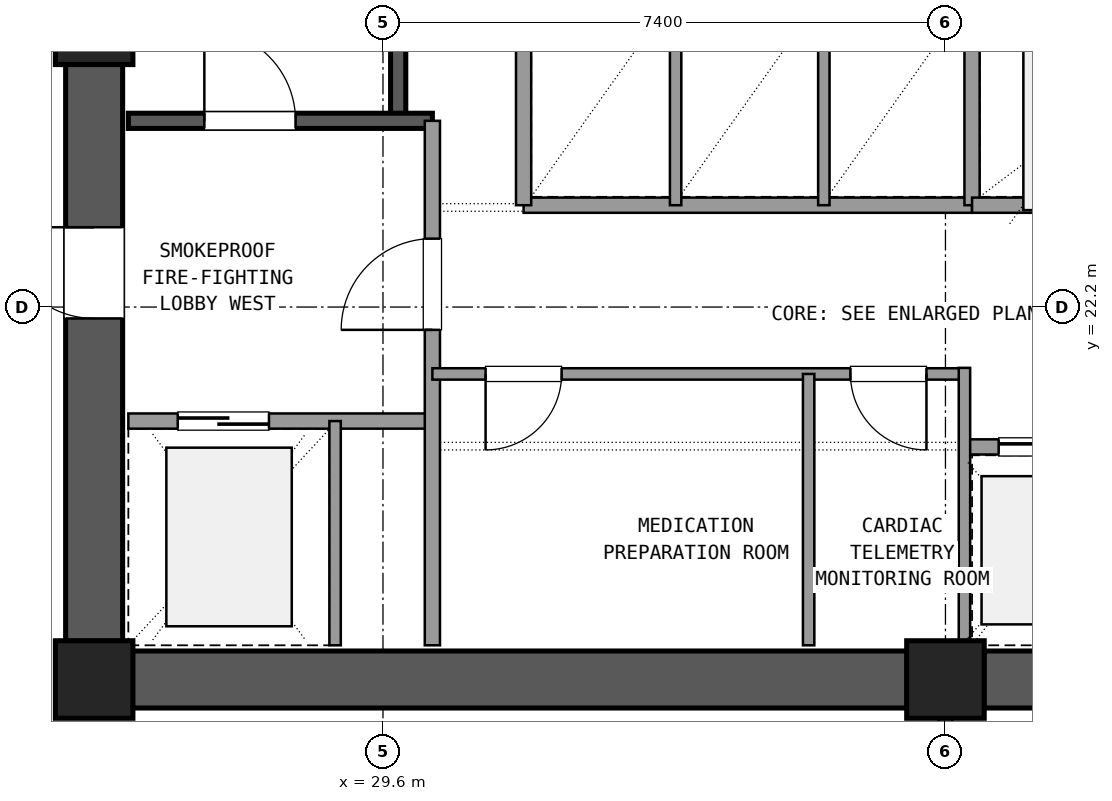
"""IFC4 building model, lengths in metres.
Left out: names, types, materials, properties, quantities, classifications, styles, units other than length and angle.
Written with IfcOpenShell. Run it as: python <this file> out.ifc"""

import sys

from ifc_helpers import new_model, si_unit, direction, frame, frame_2d, origin, origin_2d, place, context, subcontext, project, spatial, rectangle, extrude, element, fill, save


model = new_model("IFC4")
c1 = context("Model", 3, precision=1e-05, world=origin(), true_north=direction((0.0, 1.0)))
c2 = subcontext(c1, "Body", "Model", "MODEL_VIEW")
j1 = project(units=[si_unit("LENGTHUNIT", "METRE"), si_unit("PLANEANGLEUNIT", "RADIAN")], contexts=[c1])
p1 = place(None, origin())
s1 = spatial("IfcSite", under=j1, at=p1, CompositionType="ELEMENT")
p2 = place(p1, origin())
s2 = spatial("IfcBuilding", under=s1, at=p2, CompositionType="ELEMENT")
p3 = place(p2, frame((0.0, 0.0, 95.58)))
s3 = spatial("IfcBuildingStorey", under=s2, at=p3, CompositionType="ELEMENT", Elevation=95.58)
for number, where, z_axis, x_axis in (
    (1, (25.8, 17.3, 0.0), (0.0, 0.0, 1.0), (1.0, 0.0, 0.0)),
    (2, (37.0, 17.3, 0.0), (0.0, 0.0, 1.0), (1.0, 0.0, 0.0)),
    (3, (25.8, 25.9, 0.0), (0.0, 0.0, 1.0), (1.0, 0.0, 0.0)),
):
    element("IfcColumn", number, at=place(p3, frame(where, z_axis=z_axis, x_axis=x_axis)), inside=s3, PredefinedType="COLUMN", context=c2, shape_type="SweptSolid", body=[
        extrude(rectangle(XDim=1.02, YDim=1.02, at=origin_2d()), origin(), (0.0, 0.0, 1.0), 3.6),
    ])
for number, where, z_axis, x_axis in (
    (4, (26.305, 17.3, 0.0), (0.0, 0.0, 1.0), (1.0, 0.0, 0.0)),
    (5, (37.505, 17.3, 0.0), (0.0, 0.0, 1.0), (1.0, 0.0, 0.0)),
):
    element("IfcWall", number, at=place(p3, frame(where, z_axis=z_axis, x_axis=x_axis)), inside=s3, PredefinedType="SHEAR", context=c2, shape_type="SweptSolid", body=[
        extrude(rectangle(XDim=10.19, YDim=0.75, at=frame_2d((5.095, 0.0))), origin(), (0.0, 0.0, 1.0), 3.32),
    ])
p4 = place(p3, frame((25.8, 25.395, 0.0), z_axis=(0.0, 0.0, 1.0), x_axis=(0.0, -1.0, 0.0)))
e6 = element("IfcWall", 6, at=p4, inside=s3, PredefinedType="SHEAR", context=c2, shape_type="SweptSolid", body=[
    extrude(rectangle(XDim=7.59, YDim=0.75, at=frame_2d((3.795, 0.0))), origin(), (0.0, 0.0, 1.0), 3.32),
])
p5 = place(p4, frame((2.145, 0.0, 0.0)))
e7 = element("IfcOpeningElement", 7, at=p5, cuts=e6, PredefinedType="OPENING", context=c2, shape_type="SweptSolid", body=[
    extrude(rectangle(XDim=1.2, YDim=2.15, at=frame_2d((0.6, 1.075))), frame((0.0, 0.385, 0.0), z_axis=(0.0, -1.0, 0.0), x_axis=(1.0, 0.0, 0.0)), (0.0, 0.0, 1.0), 0.77),
])
p6 = place(p3, frame((29.8, 24.65, 0.0), z_axis=(0.0, 0.0, 1.0), x_axis=(0.0, 1.0, 0.0)))
e8 = element("IfcWall", 8, at=p6, inside=s3, PredefinedType="SHEAR", context=c2, shape_type="SweptSolid", body=[
    extrude(rectangle(XDim=9.4, YDim=0.2, at=frame_2d((4.7, 0.0))), origin(), (0.0, 0.0, 1.0), 3.32),
])
p7 = place(p3, frame((26.25, 24.65, 0.0), z_axis=(0.0, 0.0, 1.0), x_axis=(1.0, 0.0, 0.0)))
e9 = element("IfcWall", 9, at=p7, inside=s3, PredefinedType="SHEAR", context=c2, shape_type="SweptSolid", body=[
    extrude(rectangle(XDim=4.0, YDim=0.2, at=frame_2d((2.0, 0.0))), origin(), (0.0, 0.0, 1.0), 3.32),
])
p8 = place(p7, frame((1.0, 0.0, 0.0)))
e10 = element("IfcOpeningElement", 10, at=p8, cuts=e9, PredefinedType="OPENING", context=c2, shape_type="SweptSolid", body=[
    extrude(rectangle(XDim=1.2, YDim=2.15, at=frame_2d((0.6, 1.075))), frame((0.0, 0.11, 0.0), z_axis=(0.0, -1.0, 0.0), x_axis=(1.0, 0.0, 0.0)), (0.0, 0.0, 1.0), 0.22),
])
p9 = place(p3, frame((26.25, 20.7, 0.0), z_axis=(0.0, 0.0, 1.0), x_axis=(1.0, 0.0, 0.0)))
e11 = element("IfcWall", 11, at=p9, inside=s3, PredefinedType="SOLIDWALL", context=c2, shape_type="SweptSolid", body=[
    extrude(rectangle(XDim=4.0, YDim=0.2, at=frame_2d((2.0, 0.0))), origin(), (0.0, 0.0, 1.0), 2.61),
])
p10 = place(p9, frame((0.65, 0.0, 0.0)))
e12 = element("IfcOpeningElement", 12, at=p10, cuts=e11, PredefinedType="OPENING", context=c2, shape_type="SweptSolid", body=[
    extrude(rectangle(XDim=1.2, YDim=2.15, at=frame_2d((0.6, 1.075))), frame((0.0, 0.11, 0.0), z_axis=(0.0, -1.0, 0.0), x_axis=(1.0, 0.0, 0.0)), (0.0, 0.0, 1.0), 0.22),
])
p11 = place(p3, frame((30.25, 17.75, 0.0), z_axis=(0.0, 0.0, 1.0), x_axis=(0.0, 1.0, 0.0)))
e13 = element("IfcWall", 13, at=p11, inside=s3, PredefinedType="SOLIDWALL", context=c2, shape_type="SweptSolid", body=[
    extrude(rectangle(XDim=6.9, YDim=0.2, at=frame_2d((3.45, 0.0))), origin(), (0.0, 0.0, 1.0), 2.61),
])
p12 = place(p11, frame((4.15, 0.0, 0.0)))
e14 = element("IfcOpeningElement", 14, at=p12, cuts=e13, PredefinedType="OPENING", context=c2, shape_type="SweptSolid", body=[
    extrude(rectangle(XDim=1.2, YDim=2.15, at=frame_2d((0.6, 1.075))), frame((0.0, 0.11, 0.0), z_axis=(0.0, -1.0, 0.0), x_axis=(1.0, 0.0, 0.0)), (0.0, 0.0, 1.0), 0.22),
])
p13 = place(p3, frame((28.97, 17.75, 0.0), z_axis=(0.0, 0.0, 1.0), x_axis=(0.0, 1.0, 0.0)))
e15 = element("IfcWall", 15, at=p13, inside=s3, PredefinedType="PARTITIONING", context=c2, shape_type="SweptSolid", body=[
    extrude(rectangle(XDim=2.95, YDim=0.15, at=frame_2d((1.475, 0.0))), origin(), (0.0, 0.0, 1.0), 2.61),
])
p14 = place(p3, frame((30.25, 21.32, 0.0), z_axis=(0.0, 0.0, 1.0), x_axis=(1.0, 0.0, 0.0)))
e16 = element("IfcWall", 16, at=p14, inside=s3, PredefinedType="PARTITIONING", context=c2, shape_type="SweptSolid", body=[
    extrude(rectangle(XDim=7.0, YDim=0.15, at=frame_2d((3.5, 0.0))), origin(), (0.0, 0.0, 1.0), 2.61),
])
p15 = place(p14, frame((0.7, 0.0, 0.0)))
e17 = element("IfcOpeningElement", 17, at=p15, cuts=e16, PredefinedType="OPENING", context=c2, shape_type="SweptSolid", body=[
    extrude(rectangle(XDim=1.0, YDim=2.15, at=frame_2d((0.5, 1.075))), frame((0.0, 0.085, 0.0), z_axis=(0.0, -1.0, 0.0), x_axis=(1.0, 0.0, 0.0)), (0.0, 0.0, 1.0), 0.17),
])
p16 = place(p14, frame((5.5, 0.0, 0.0)))
e18 = element("IfcOpeningElement", 18, at=p16, cuts=e16, PredefinedType="OPENING", context=c2, shape_type="SweptSolid", body=[
    extrude(rectangle(XDim=1.0, YDim=2.15, at=frame_2d((0.5, 1.075))), frame((0.0, 0.085, 0.0), z_axis=(0.0, -1.0, 0.0), x_axis=(1.0, 0.0, 0.0)), (0.0, 0.0, 1.0), 0.17),
])
p17 = place(p3, frame((35.2, 17.75, 0.0), z_axis=(0.0, 0.0, 1.0), x_axis=(0.0, 1.0, 0.0)))
e19 = element("IfcWall", 19, at=p17, inside=s3, PredefinedType="PARTITIONING", context=c2, shape_type="SweptSolid", body=[
    extrude(rectangle(XDim=3.57, YDim=0.15, at=frame_2d((1.785, 0.0))), origin(), (0.0, 0.0, 1.0), 2.61),
])
p18 = place(p3, frame((37.25, 20.36, 0.0), z_axis=(0.0, 0.0, 1.0), x_axis=(1.0, 0.0, 0.0)))
e20 = element("IfcWall", 20, at=p18, inside=s3, PredefinedType="SOLIDWALL", context=c2, shape_type="SweptSolid", body=[
    extrude(rectangle(XDim=6.1, YDim=0.2, at=frame_2d((3.05, 0.0))), origin(), (0.0, 0.0, 1.0), 2.61),
])
p19 = place(p18, frame((0.45, 0.0, 0.0)))
e21 = element("IfcOpeningElement", 21, at=p19, cuts=e20, PredefinedType="OPENING", context=c2, shape_type="SweptSolid", body=[
    extrude(rectangle(XDim=1.1, YDim=2.15, at=frame_2d((0.55, 1.075))), frame((0.0, 0.11, 0.0), z_axis=(0.0, -1.0, 0.0), x_axis=(1.0, 0.0, 0.0)), (0.0, 0.0, 1.0), 0.22),
])
p20 = place(p18, frame((2.5, 0.0, 0.0)))
e22 = element("IfcOpeningElement", 22, at=p20, cuts=e20, PredefinedType="OPENING", context=c2, shape_type="SweptSolid", body=[
    extrude(rectangle(XDim=1.1, YDim=2.15, at=frame_2d((0.55, 1.075))), frame((0.0, 0.11, 0.0), z_axis=(0.0, -1.0, 0.0), x_axis=(1.0, 0.0, 0.0)), (0.0, 0.0, 1.0), 0.22),
])
p21 = place(p18, frame((4.55, 0.0, 0.0)))
e23 = element("IfcOpeningElement", 23, at=p21, cuts=e20, PredefinedType="OPENING", context=c2, shape_type="SweptSolid", body=[
    extrude(rectangle(XDim=1.1, YDim=2.15, at=frame_2d((0.55, 1.075))), frame((0.0, 0.11, 0.0), z_axis=(0.0, -1.0, 0.0), x_axis=(1.0, 0.0, 0.0)), (0.0, 0.0, 1.0), 0.22),
])
p22 = place(p3, frame((37.25, 17.75, 0.0), z_axis=(0.0, 0.0, 1.0), x_axis=(0.0, 1.0, 0.0)))
e24 = element("IfcWall", 24, at=p22, inside=s3, PredefinedType="PARTITIONING", context=c2, shape_type="SweptSolid", body=[
    extrude(rectangle(XDim=3.65, YDim=0.15, at=frame_2d((1.825, 0.0))), origin(), (0.0, 0.0, 1.0), 2.61),
])
p23 = place(p3, frame((31.45, 23.54, 0.0), z_axis=(0.0, 0.0, 1.0), x_axis=(1.0, 0.0, 0.0)))
e25 = element("IfcWall", 25, at=p23, inside=s3, PredefinedType="SOLIDWALL", context=c2, shape_type="SweptSolid", body=[
    extrude(rectangle(XDim=5.9, YDim=0.2, at=frame_2d((2.95, 0.0))), origin(), (0.0, 0.0, 1.0), 2.61),
])
p24 = place(p3, frame((31.45, 23.54, 0.0), z_axis=(0.0, 0.0, 1.0), x_axis=(0.0, 1.0, 0.0)))
e26 = element("IfcWall", 26, at=p24, inside=s3, PredefinedType="SOLIDWALL", context=c2, shape_type="SweptSolid", body=[
    extrude(rectangle(XDim=2.81, YDim=0.2, at=frame_2d((1.405, 0.0))), origin(), (0.0, 0.0, 1.0), 2.61),
])
for number, where, z_axis, x_axis in (
    (27, (33.45, 23.54, 0.0), (0.0, 0.0, 1.0), (0.0, 1.0, 0.0)),
    (28, (35.4, 23.54, 0.0), (0.0, 0.0, 1.0), (0.0, 1.0, 0.0)),
):
    element("IfcWall", number, at=place(p3, frame(where, z_axis=z_axis, x_axis=x_axis)), inside=s3, PredefinedType="PARTITIONING", context=c2, shape_type="SweptSolid", body=[
        extrude(rectangle(XDim=2.81, YDim=0.15, at=frame_2d((1.405, 0.0))), origin(), (0.0, 0.0, 1.0), 2.61),
    ])
p25 = place(p3, frame((37.35, 23.54, 0.0), z_axis=(0.0, 0.0, 1.0), x_axis=(0.0, 1.0, 0.0)))
e29 = element("IfcWall", 29, at=p25, inside=s3, PredefinedType="SOLIDWALL", context=c2, shape_type="SweptSolid", body=[
    extrude(rectangle(XDim=6.82, YDim=0.2, at=frame_2d((3.41, 0.0))), origin(), (0.0, 0.0, 1.0), 2.61),
])
p26 = place(p3, frame((37.35, 23.54, 0.0), z_axis=(0.0, 0.0, 1.0), x_axis=(1.0, 0.0, 0.0)))
e30 = element("IfcWall", 30, at=p26, inside=s3, PredefinedType="SOLIDWALL", context=c2, shape_type="SweptSolid", body=[
    extrude(rectangle(XDim=3.05, YDim=0.2, at=frame_2d((1.525, 0.0))), origin(), (0.0, 0.0, 1.0), 2.61),
])
p27 = place(p3, frame((37.0, 13.64, 0.0), z_axis=(0.0, 0.0, 1.0), x_axis=(0.0, 1.0, 0.0)))
e31 = element("IfcWall", 31, at=p27, inside=s3, PredefinedType="PARTITIONING", context=c2, shape_type="SweptSolid", body=[
    extrude(rectangle(XDim=3.21, YDim=0.18, at=frame_2d((1.605, 0.0))), origin(), (0.0, 0.0, 1.0), 2.61),
])
p28 = place(p27, frame((0.605, 0.0, 0.0)))
e32 = element("IfcOpeningElement", 32, at=p28, cuts=e31, PredefinedType="OPENING", context=c2, shape_type="SweptSolid", body=[
    extrude(rectangle(XDim=2.0, YDim=2.2, at=frame_2d((1.0, 1.1))), frame((0.0, 0.1, 0.0), z_axis=(0.0, -1.0, 0.0), x_axis=(1.0, 0.0, 0.0)), (0.0, 0.0, 1.0), 0.2),
])
p29 = place(p8, origin())
e33 = element("IfcDoor", 33, at=p29, inside=s3, OperationType="SINGLE_SWING_LEFT", PredefinedType="DOOR", context=c2, shape_type="SweptSolid", body=[
    extrude(rectangle(XDim=1.2, YDim=2.15, at=frame_2d((0.6, 1.075))), frame((0.0, 0.025, 0.0), z_axis=(0.0, -1.0, 0.0), x_axis=(1.0, 0.0, 0.0)), (0.0, 0.0, 1.0), 0.05),
])
fill(e10, e33)
p30 = place(p10, origin())
e34 = element("IfcDoor", 34, at=p30, inside=s3, OperationType="SLIDING_TO_LEFT", PredefinedType="DOOR", context=c2, shape_type="SweptSolid", body=[
    extrude(rectangle(XDim=1.2, YDim=2.15, at=frame_2d((0.6, 1.075))), frame((0.0, 0.025, 0.0), z_axis=(0.0, -1.0, 0.0), x_axis=(1.0, 0.0, 0.0)), (0.0, 0.0, 1.0), 0.05),
])
fill(e12, e34)
p31 = place(p12, origin())
e35 = element("IfcDoor", 35, at=p31, inside=s3, OperationType="SINGLE_SWING_LEFT", PredefinedType="DOOR", context=c2, shape_type="SweptSolid", body=[
    extrude(rectangle(XDim=1.2, YDim=2.15, at=frame_2d((0.6, 1.075))), frame((0.0, 0.025, 0.0), z_axis=(0.0, -1.0, 0.0), x_axis=(1.0, 0.0, 0.0)), (0.0, 0.0, 1.0), 0.05),
])
fill(e14, e35)
p32 = place(p5, frame((1.2, 0.0, 0.0), z_axis=(0.0, 0.0, 1.0), x_axis=(-1.0, 0.0, 0.0)))
e36 = element("IfcDoor", 36, at=p32, inside=s3, OperationType="SINGLE_SWING_LEFT", PredefinedType="DOOR", context=c2, shape_type="SweptSolid", body=[
    extrude(rectangle(XDim=1.2, YDim=2.15, at=frame_2d((0.6, 1.075))), frame((0.0, 0.025, 0.0), z_axis=(0.0, -1.0, 0.0), x_axis=(1.0, 0.0, 0.0)), (0.0, 0.0, 1.0), 0.05),
])
fill(e7, e36)
p33 = place(p15, frame((1.0, 0.0, 0.0), z_axis=(0.0, 0.0, 1.0), x_axis=(-1.0, 0.0, 0.0)))
e37 = element("IfcDoor", 37, at=p33, inside=s3, OperationType="SINGLE_SWING_LEFT", PredefinedType="DOOR", context=c2, shape_type="SweptSolid", body=[
    extrude(rectangle(XDim=1.0, YDim=2.15, at=frame_2d((0.5, 1.075))), frame((0.0, 0.025, 0.0), z_axis=(0.0, -1.0, 0.0), x_axis=(1.0, 0.0, 0.0)), (0.0, 0.0, 1.0), 0.05),
])
fill(e17, e37)
p34 = place(p16, frame((1.0, 0.0, 0.0), z_axis=(0.0, 0.0, 1.0), x_axis=(-1.0, 0.0, 0.0)))
e38 = element("IfcDoor", 38, at=p34, inside=s3, OperationType="SINGLE_SWING_RIGHT", PredefinedType="DOOR", context=c2, shape_type="SweptSolid", body=[
    extrude(rectangle(XDim=1.0, YDim=2.15, at=frame_2d((0.5, 1.075))), frame((0.0, 0.025, 0.0), z_axis=(0.0, -1.0, 0.0), x_axis=(1.0, 0.0, 0.0)), (0.0, 0.0, 1.0), 0.05),
])
fill(e18, e38)
p35 = place(p19, origin())
e39 = element("IfcDoor", 39, at=p35, inside=s3, OperationType="SLIDING_TO_LEFT", PredefinedType="DOOR", context=c2, shape_type="SweptSolid", body=[
    extrude(rectangle(XDim=1.1, YDim=2.15, at=frame_2d((0.55, 1.075))), frame((0.0, 0.025, 0.0), z_axis=(0.0, -1.0, 0.0), x_axis=(1.0, 0.0, 0.0)), (0.0, 0.0, 1.0), 0.05),
])
fill(e21, e39)
save(model, sys.argv[1])
